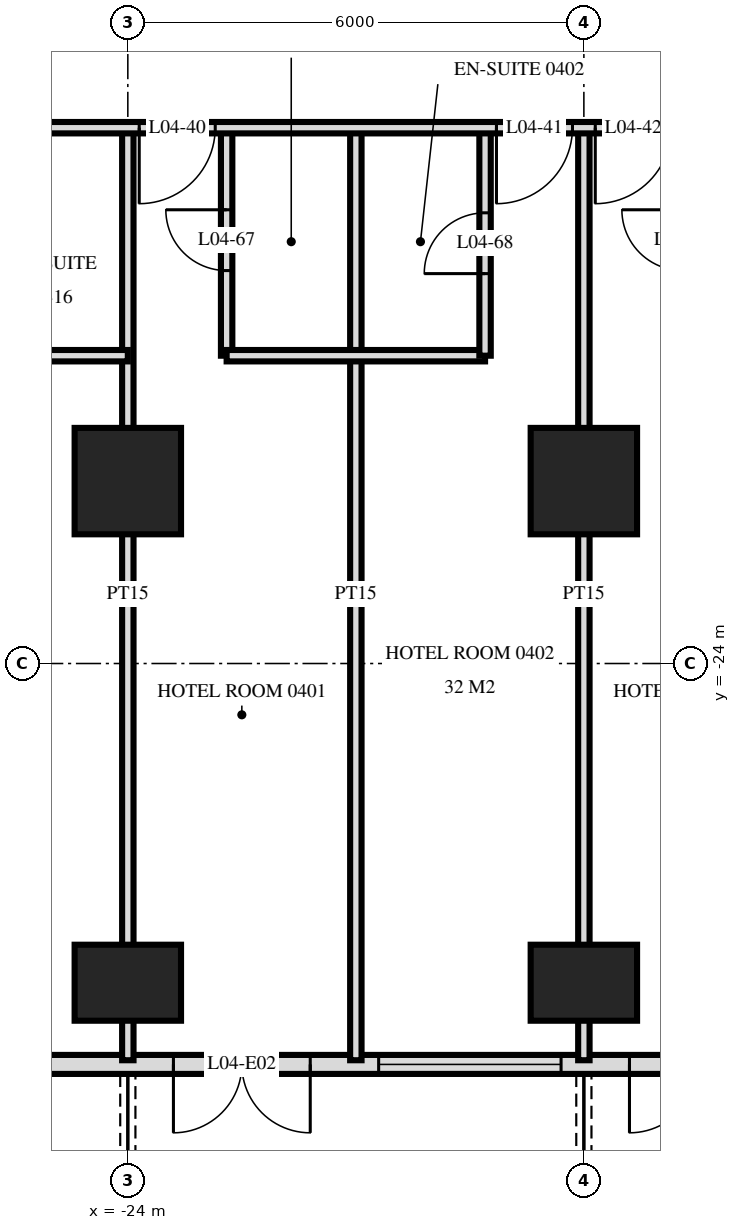
"""IFC4 building model, lengths in metres.
Left out: names, types, materials, properties, quantities, classifications, styles, units other than length and angle.
Written with IfcOpenShell. Run it as: python <this file> out.ifc"""

import sys

from ifc_helpers import new_model, si_unit, direction, frame, frame_2d, origin, origin_2d, place, context, subcontext, project, spatial, rectangle, extrude, element, fill, save


model = new_model("IFC4")
c1 = context("Model", 3, precision=1e-05, world=origin(), true_north=direction((0.0, 1.0)))
c2 = subcontext(c1, "Body", "Model", "MODEL_VIEW")
j1 = project(units=[si_unit("LENGTHUNIT", "METRE"), si_unit("PLANEANGLEUNIT", "RADIAN")], contexts=[c1])
p1 = place(None, origin())
s1 = spatial("IfcSite", under=j1, at=p1, CompositionType="ELEMENT")
p2 = place(p1, origin())
s2 = spatial("IfcBuilding", under=s1, at=p2, CompositionType="ELEMENT")
p3 = place(p2, frame((0.0, 0.0, 24.0)))
s3 = spatial("IfcBuildingStorey", under=s2, at=p3, CompositionType="ELEMENT", Elevation=24.0)
p4 = place(p3, frame((-24.0, -28.2, -0.28), z_axis=(0.0, 0.0, 1.0), x_axis=(1.0, 0.0, 0.0)))
e1 = element("IfcColumn", 1, at=p4, inside=s3, PredefinedType="COLUMN", context=c2, shape_type="SweptSolid", body=[
    extrude(rectangle(XDim=1.4, YDim=1.0, at=origin_2d()), origin(), (0.0, 0.0, 1.0), 3.88),
])
p5 = place(p3, frame((-24.0, -21.6, -0.28), z_axis=(0.0, 0.0, 1.0), x_axis=(1.0, 0.0, 0.0)))
e2 = element("IfcColumn", 2, at=p5, inside=s3, PredefinedType="COLUMN", context=c2, shape_type="SweptSolid", body=[
    extrude(rectangle(XDim=1.4, YDim=1.4, at=origin_2d()), origin(), (0.0, 0.0, 1.0), 3.88),
])
p6 = place(p3, frame((-18.0, -28.2, -0.28), z_axis=(0.0, 0.0, 1.0), x_axis=(1.0, 0.0, 0.0)))
e3 = element("IfcColumn", 3, at=p6, inside=s3, PredefinedType="COLUMN", context=c2, shape_type="SweptSolid", body=[
    extrude(rectangle(XDim=1.4, YDim=1.0, at=origin_2d()), origin(), (0.0, 0.0, 1.0), 3.88),
])
p7 = place(p3, frame((-18.0, -21.6, -0.28), z_axis=(0.0, 0.0, 1.0), x_axis=(1.0, 0.0, 0.0)))
e4 = element("IfcColumn", 4, at=p7, inside=s3, PredefinedType="COLUMN", context=c2, shape_type="SweptSolid", body=[
    extrude(rectangle(XDim=1.4, YDim=1.4, at=origin_2d()), origin(), (0.0, 0.0, 1.0), 3.88),
])
p8 = place(p3, frame((-28.775, -29.275, 0.0), z_axis=(0.0, 0.0, 1.0), x_axis=(1.0, 0.0, 0.0)))
e5 = element("IfcWall", 5, at=p8, inside=s3, PredefinedType="SOLIDWALL", context=c2, shape_type="SweptSolid", body=[
    extrude(rectangle(XDim=57.551, YDim=0.25, at=frame_2d((28.775, 0.0))), origin(), (0.0, 0.0, 1.0), 3.32),
])
p9 = place(p8, frame((0.575, 0.0, 0.0)))
e6 = element("IfcOpeningElement", 6, at=p9, cuts=e5, PredefinedType="OPENING", context=c2, shape_type="SweptSolid", body=[
    extrude(rectangle(XDim=1.8, YDim=2.4, at=frame_2d((0.9, 1.2))), frame((0.0, 0.135, 0.0), z_axis=(0.0, -1.0, 0.0), x_axis=(1.0, 0.0, 0.0)), (0.0, 0.0, 1.0), 0.27),
])
p10 = place(p8, frame((5.375, 0.0, 0.0)))
e7 = element("IfcOpeningElement", 7, at=p10, cuts=e5, PredefinedType="OPENING", context=c2, shape_type="SweptSolid", body=[
    extrude(rectangle(XDim=1.8, YDim=2.4, at=frame_2d((0.9, 1.2))), frame((0.0, 0.135, 0.0), z_axis=(0.0, -1.0, 0.0), x_axis=(1.0, 0.0, 0.0)), (0.0, 0.0, 1.0), 0.27),
])
p11 = place(p8, frame((8.075, 0.0, 0.3)))
e8 = element("IfcOpeningElement", 8, at=p11, cuts=e5, PredefinedType="OPENING", context=c2, shape_type="SweptSolid", body=[
    extrude(rectangle(XDim=2.4, YDim=2.1, at=frame_2d((1.2, 1.05))), frame((0.0, 0.135, 0.0), z_axis=(0.0, -1.0, 0.0), x_axis=(1.0, 0.0, 0.0)), (0.0, 0.0, 1.0), 0.27),
])
p12 = place(p8, frame((11.375, 0.0, 0.0)))
e9 = element("IfcOpeningElement", 9, at=p12, cuts=e5, PredefinedType="OPENING", context=c2, shape_type="SweptSolid", body=[
    extrude(rectangle(XDim=1.8, YDim=2.4, at=frame_2d((0.9, 1.2))), frame((0.0, 0.135, 0.0), z_axis=(0.0, -1.0, 0.0), x_axis=(1.0, 0.0, 0.0)), (0.0, 0.0, 1.0), 0.27),
])
p13 = place(p8, frame((14.075, 0.0, 0.3)))
e10 = element("IfcOpeningElement", 10, at=p13, cuts=e5, PredefinedType="OPENING", context=c2, shape_type="SweptSolid", body=[
    extrude(rectangle(XDim=2.4, YDim=2.1, at=frame_2d((1.2, 1.05))), frame((0.0, 0.135, 0.0), z_axis=(0.0, -1.0, 0.0), x_axis=(1.0, 0.0, 0.0)), (0.0, 0.0, 1.0), 0.27),
])
p14 = place(p8, frame((17.375, 0.0, 0.0)))
e11 = element("IfcOpeningElement", 11, at=p14, cuts=e5, PredefinedType="OPENING", context=c2, shape_type="SweptSolid", body=[
    extrude(rectangle(XDim=1.8, YDim=2.4, at=frame_2d((0.9, 1.2))), frame((0.0, 0.135, 0.0), z_axis=(0.0, -1.0, 0.0), x_axis=(1.0, 0.0, 0.0)), (0.0, 0.0, 1.0), 0.27),
])
p15 = place(p8, frame((20.075, 0.0, 0.3)))
e12 = element("IfcOpeningElement", 12, at=p15, cuts=e5, PredefinedType="OPENING", context=c2, shape_type="SweptSolid", body=[
    extrude(rectangle(XDim=2.4, YDim=2.1, at=frame_2d((1.2, 1.05))), frame((0.0, 0.135, 0.0), z_axis=(0.0, -1.0, 0.0), x_axis=(1.0, 0.0, 0.0)), (0.0, 0.0, 1.0), 0.27),
])
p16 = place(p8, frame((23.075, 0.0, 0.3)))
e13 = element("IfcOpeningElement", 13, at=p16, cuts=e5, PredefinedType="OPENING", context=c2, shape_type="SweptSolid", body=[
    extrude(rectangle(XDim=2.4, YDim=2.1, at=frame_2d((1.2, 1.05))), frame((0.0, 0.135, 0.0), z_axis=(0.0, -1.0, 0.0), x_axis=(1.0, 0.0, 0.0)), (0.0, 0.0, 1.0), 0.27),
])
p17 = place(p8, frame((26.375, 0.0, 0.0)))
e14 = element("IfcOpeningElement", 14, at=p17, cuts=e5, PredefinedType="OPENING", context=c2, shape_type="SweptSolid", body=[
    extrude(rectangle(XDim=1.8, YDim=2.4, at=frame_2d((0.9, 1.2))), frame((0.0, 0.135, 0.0), z_axis=(0.0, -1.0, 0.0), x_axis=(1.0, 0.0, 0.0)), (0.0, 0.0, 1.0), 0.27),
])
p18 = place(p8, frame((29.375, 0.0, 0.0)))
e15 = element("IfcOpeningElement", 15, at=p18, cuts=e5, PredefinedType="OPENING", context=c2, shape_type="SweptSolid", body=[
    extrude(rectangle(XDim=1.8, YDim=2.4, at=frame_2d((0.9, 1.2))), frame((0.0, 0.135, 0.0), z_axis=(0.0, -1.0, 0.0), x_axis=(1.0, 0.0, 0.0)), (0.0, 0.0, 1.0), 0.27),
])
p19 = place(p8, frame((32.075, 0.0, 0.3)))
e16 = element("IfcOpeningElement", 16, at=p19, cuts=e5, PredefinedType="OPENING", context=c2, shape_type="SweptSolid", body=[
    extrude(rectangle(XDim=2.4, YDim=2.1, at=frame_2d((1.2, 1.05))), frame((0.0, 0.135, 0.0), z_axis=(0.0, -1.0, 0.0), x_axis=(1.0, 0.0, 0.0)), (0.0, 0.0, 1.0), 0.27),
])
p20 = place(p8, frame((35.375, 0.0, 0.0)))
e17 = element("IfcOpeningElement", 17, at=p20, cuts=e5, PredefinedType="OPENING", context=c2, shape_type="SweptSolid", body=[
    extrude(rectangle(XDim=1.8, YDim=2.4, at=frame_2d((0.9, 1.2))), frame((0.0, 0.135, 0.0), z_axis=(0.0, -1.0, 0.0), x_axis=(1.0, 0.0, 0.0)), (0.0, 0.0, 1.0), 0.27),
])
p21 = place(p8, frame((38.075, 0.0, 0.3)))
e18 = element("IfcOpeningElement", 18, at=p21, cuts=e5, PredefinedType="OPENING", context=c2, shape_type="SweptSolid", body=[
    extrude(rectangle(XDim=2.4, YDim=2.1, at=frame_2d((1.2, 1.05))), frame((0.0, 0.135, 0.0), z_axis=(0.0, -1.0, 0.0), x_axis=(1.0, 0.0, 0.0)), (0.0, 0.0, 1.0), 0.27),
])
p22 = place(p8, frame((41.375, 0.0, 0.0)))
e19 = element("IfcOpeningElement", 19, at=p22, cuts=e5, PredefinedType="OPENING", context=c2, shape_type="SweptSolid", body=[
    extrude(rectangle(XDim=1.8, YDim=2.4, at=frame_2d((0.9, 1.2))), frame((0.0, 0.135, 0.0), z_axis=(0.0, -1.0, 0.0), x_axis=(1.0, 0.0, 0.0)), (0.0, 0.0, 1.0), 0.27),
])
p23 = place(p8, frame((44.075, 0.0, 0.3)))
e20 = element("IfcOpeningElement", 20, at=p23, cuts=e5, PredefinedType="OPENING", context=c2, shape_type="SweptSolid", body=[
    extrude(rectangle(XDim=2.4, YDim=2.1, at=frame_2d((1.2, 1.05))), frame((0.0, 0.135, 0.0), z_axis=(0.0, -1.0, 0.0), x_axis=(1.0, 0.0, 0.0)), (0.0, 0.0, 1.0), 0.27),
])
p24 = place(p8, frame((47.075, 0.0, 0.3)))
e21 = element("IfcOpeningElement", 21, at=p24, cuts=e5, PredefinedType="OPENING", context=c2, shape_type="SweptSolid", body=[
    extrude(rectangle(XDim=2.4, YDim=2.1, at=frame_2d((1.2, 1.05))), frame((0.0, 0.135, 0.0), z_axis=(0.0, -1.0, 0.0), x_axis=(1.0, 0.0, 0.0)), (0.0, 0.0, 1.0), 0.27),
])
p25 = place(p8, frame((50.375, 0.0, 0.0)))
e22 = element("IfcOpeningElement", 22, at=p25, cuts=e5, PredefinedType="OPENING", context=c2, shape_type="SweptSolid", body=[
    extrude(rectangle(XDim=1.8, YDim=2.4, at=frame_2d((0.9, 1.2))), frame((0.0, 0.135, 0.0), z_axis=(0.0, -1.0, 0.0), x_axis=(1.0, 0.0, 0.0)), (0.0, 0.0, 1.0), 0.27),
])
p26 = place(p8, frame((53.375, 0.0, 0.0)))
e23 = element("IfcOpeningElement", 23, at=p26, cuts=e5, PredefinedType="OPENING", context=c2, shape_type="SweptSolid", body=[
    extrude(rectangle(XDim=1.8, YDim=2.4, at=frame_2d((0.9, 1.2))), frame((0.0, 0.135, 0.0), z_axis=(0.0, -1.0, 0.0), x_axis=(1.0, 0.0, 0.0)), (0.0, 0.0, 1.0), 0.27),
])
p27 = place(p3, frame((-18.0, -29.22, 0.0), z_axis=(0.0, 0.0, 1.0), x_axis=(0.0, 1.0, 0.0)))
e24 = element("IfcWall", 24, at=p27, inside=s3, PredefinedType="PARTITIONING", context=c2, shape_type="SweptSolid", body=[
    extrude(rectangle(XDim=12.27, YDim=0.15, at=frame_2d((6.135, 0.0))), origin(), (0.0, 0.0, 1.0), 3.32),
])
p28 = place(p3, frame((-19.3, -19.95, 0.0), z_axis=(0.0, 0.0, 1.0), x_axis=(0.0, 1.0, 0.0)))
e25 = element("IfcWall", 25, at=p28, inside=s3, PredefinedType="PARTITIONING", context=c2, shape_type="SweptSolid", body=[
    extrude(rectangle(XDim=3.0, YDim=0.15, at=frame_2d((1.5, 0.0))), origin(), (0.0, 0.0, 1.0), 3.32),
])
p29 = place(p28, frame((1.08, 0.0, 0.0)))
e26 = element("IfcOpeningElement", 26, at=p29, cuts=e25, PredefinedType="OPENING", context=c2, shape_type="SweptSolid", body=[
    extrude(rectangle(XDim=0.8, YDim=2.1, at=frame_2d((0.4, 1.05))), frame((0.0, 0.085, 0.0), z_axis=(0.0, -1.0, 0.0), x_axis=(1.0, 0.0, 0.0)), (0.0, 0.0, 1.0), 0.17),
])
p30 = place(p3, frame((-21.0, -29.22, 0.0), z_axis=(0.0, 0.0, 1.0), x_axis=(0.0, 1.0, 0.0)))
e27 = element("IfcWall", 27, at=p30, inside=s3, PredefinedType="PARTITIONING", context=c2, shape_type="SweptSolid", body=[
    extrude(rectangle(XDim=12.27, YDim=0.15, at=frame_2d((6.135, 0.0))), origin(), (0.0, 0.0, 1.0), 3.32),
])
p31 = place(p3, frame((-22.7, -19.95, 0.0), z_axis=(0.0, 0.0, 1.0), x_axis=(0.0, 1.0, 0.0)))
e28 = element("IfcWall", 28, at=p31, inside=s3, PredefinedType="PARTITIONING", context=c2, shape_type="SweptSolid", body=[
    extrude(rectangle(XDim=3.0, YDim=0.15, at=frame_2d((1.5, 0.0))), origin(), (0.0, 0.0, 1.0), 3.32),
])
p32 = place(p31, frame((1.12, 0.0, 0.0)))
e29 = element("IfcOpeningElement", 29, at=p32, cuts=e28, PredefinedType="OPENING", context=c2, shape_type="SweptSolid", body=[
    extrude(rectangle(XDim=0.8, YDim=2.1, at=frame_2d((0.4, 1.05))), frame((0.0, 0.085, 0.0), z_axis=(0.0, -1.0, 0.0), x_axis=(1.0, 0.0, 0.0)), (0.0, 0.0, 1.0), 0.17),
])
p33 = place(p3, frame((-24.0, -29.22, 0.0), z_axis=(0.0, 0.0, 1.0), x_axis=(0.0, 1.0, 0.0)))
e30 = element("IfcWall", 30, at=p33, inside=s3, PredefinedType="PARTITIONING", context=c2, shape_type="SweptSolid", body=[
    extrude(rectangle(XDim=12.27, YDim=0.15, at=frame_2d((6.135, 0.0))), origin(), (0.0, 0.0, 1.0), 3.32),
])
p34 = place(p3, frame((-27.0, -19.95, 0.0), z_axis=(0.0, 0.0, 1.0), x_axis=(1.0, 0.0, 0.0)))
e31 = element("IfcWall", 31, at=p34, inside=s3, PredefinedType="PARTITIONING", context=c2, shape_type="SweptSolid", body=[
    extrude(rectangle(XDim=3.0, YDim=0.15, at=frame_2d((1.5, 0.0))), origin(), (0.0, 0.0, 1.0), 3.32),
])
p35 = place(p3, frame((-22.7, -19.95, 0.0), z_axis=(0.0, 0.0, 1.0), x_axis=(1.0, 0.0, 0.0)))
e32 = element("IfcWall", 32, at=p35, inside=s3, PredefinedType="PARTITIONING", context=c2, shape_type="SweptSolid", body=[
    extrude(rectangle(XDim=3.4, YDim=0.15, at=frame_2d((1.7, 0.0))), origin(), (0.0, 0.0, 1.0), 3.32),
])
p36 = place(p3, frame((-33.12, -16.95, 0.0), z_axis=(0.0, 0.0, 1.0), x_axis=(1.0, 0.0, 0.0)))
e33 = element("IfcWall", 33, at=p36, inside=s3, PredefinedType="PARTITIONING", context=c2, shape_type="SweptSolid", body=[
    extrude(rectangle(XDim=66.24, YDim=0.15, at=frame_2d((33.12, 0.0))), origin(), (0.0, 0.0, 1.0), 3.32),
])
p37 = place(p36, frame((9.27, 0.0, 0.0)))
e34 = element("IfcOpeningElement", 34, at=p37, cuts=e33, PredefinedType="OPENING", context=c2, shape_type="SweptSolid", body=[
    extrude(rectangle(XDim=1.0, YDim=2.1, at=frame_2d((0.5, 1.05))), frame((0.0, 0.085, 0.0), z_axis=(0.0, -1.0, 0.0), x_axis=(1.0, 0.0, 0.0)), (0.0, 0.0, 1.0), 0.17),
])
p38 = place(p36, frame((13.97, 0.0, 0.0)))
e35 = element("IfcOpeningElement", 35, at=p38, cuts=e33, PredefinedType="OPENING", context=c2, shape_type="SweptSolid", body=[
    extrude(rectangle(XDim=1.0, YDim=2.1, at=frame_2d((0.5, 1.05))), frame((0.0, 0.085, 0.0), z_axis=(0.0, -1.0, 0.0), x_axis=(1.0, 0.0, 0.0)), (0.0, 0.0, 1.0), 0.17),
])
p39 = place(p36, frame((15.27, 0.0, 0.0)))
e36 = element("IfcOpeningElement", 36, at=p39, cuts=e33, PredefinedType="OPENING", context=c2, shape_type="SweptSolid", body=[
    extrude(rectangle(XDim=1.0, YDim=2.1, at=frame_2d((0.5, 1.05))), frame((0.0, 0.085, 0.0), z_axis=(0.0, -1.0, 0.0), x_axis=(1.0, 0.0, 0.0)), (0.0, 0.0, 1.0), 0.17),
])
p40 = place(p36, frame((19.97, 0.0, 0.0)))
e37 = element("IfcOpeningElement", 37, at=p40, cuts=e33, PredefinedType="OPENING", context=c2, shape_type="SweptSolid", body=[
    extrude(rectangle(XDim=1.0, YDim=2.1, at=frame_2d((0.5, 1.05))), frame((0.0, 0.085, 0.0), z_axis=(0.0, -1.0, 0.0), x_axis=(1.0, 0.0, 0.0)), (0.0, 0.0, 1.0), 0.17),
])
p41 = place(p36, frame((22.27, 0.0, 0.0)))
e38 = element("IfcOpeningElement", 38, at=p41, cuts=e33, PredefinedType="OPENING", context=c2, shape_type="SweptSolid", body=[
    extrude(rectangle(XDim=1.0, YDim=2.1, at=frame_2d((0.5, 1.05))), frame((0.0, 0.085, 0.0), z_axis=(0.0, -1.0, 0.0), x_axis=(1.0, 0.0, 0.0)), (0.0, 0.0, 1.0), 0.17),
])
p42 = place(p36, frame((28.97, 0.0, 0.0)))
e39 = element("IfcOpeningElement", 39, at=p42, cuts=e33, PredefinedType="OPENING", context=c2, shape_type="SweptSolid", body=[
    extrude(rectangle(XDim=1.0, YDim=2.1, at=frame_2d((0.5, 1.05))), frame((0.0, 0.085, 0.0), z_axis=(0.0, -1.0, 0.0), x_axis=(1.0, 0.0, 0.0)), (0.0, 0.0, 1.0), 0.17),
])
p43 = place(p36, frame((30.27, 0.0, 0.0)))
e40 = element("IfcOpeningElement", 40, at=p43, cuts=e33, PredefinedType="OPENING", context=c2, shape_type="SweptSolid", body=[
    extrude(rectangle(XDim=1.0, YDim=2.1, at=frame_2d((0.5, 1.05))), frame((0.0, 0.085, 0.0), z_axis=(0.0, -1.0, 0.0), x_axis=(1.0, 0.0, 0.0)), (0.0, 0.0, 1.0), 0.17),
])
p44 = place(p36, frame((34.97, 0.0, 0.0)))
e41 = element("IfcOpeningElement", 41, at=p44, cuts=e33, PredefinedType="OPENING", context=c2, shape_type="SweptSolid", body=[
    extrude(rectangle(XDim=1.0, YDim=2.1, at=frame_2d((0.5, 1.05))), frame((0.0, 0.085, 0.0), z_axis=(0.0, -1.0, 0.0), x_axis=(1.0, 0.0, 0.0)), (0.0, 0.0, 1.0), 0.17),
])
p45 = place(p36, frame((36.27, 0.0, 0.0)))
e42 = element("IfcOpeningElement", 42, at=p45, cuts=e33, PredefinedType="OPENING", context=c2, shape_type="SweptSolid", body=[
    extrude(rectangle(XDim=1.0, YDim=2.1, at=frame_2d((0.5, 1.05))), frame((0.0, 0.085, 0.0), z_axis=(0.0, -1.0, 0.0), x_axis=(1.0, 0.0, 0.0)), (0.0, 0.0, 1.0), 0.17),
])
p46 = place(p36, frame((40.97, 0.0, 0.0)))
e43 = element("IfcOpeningElement", 43, at=p46, cuts=e33, PredefinedType="OPENING", context=c2, shape_type="SweptSolid", body=[
    extrude(rectangle(XDim=1.0, YDim=2.1, at=frame_2d((0.5, 1.05))), frame((0.0, 0.085, 0.0), z_axis=(0.0, -1.0, 0.0), x_axis=(1.0, 0.0, 0.0)), (0.0, 0.0, 1.0), 0.17),
])
p47 = place(p36, frame((42.27, 0.0, 0.0)))
e44 = element("IfcOpeningElement", 44, at=p47, cuts=e33, PredefinedType="OPENING", context=c2, shape_type="SweptSolid", body=[
    extrude(rectangle(XDim=1.0, YDim=2.1, at=frame_2d((0.5, 1.05))), frame((0.0, 0.085, 0.0), z_axis=(0.0, -1.0, 0.0), x_axis=(1.0, 0.0, 0.0)), (0.0, 0.0, 1.0), 0.17),
])
p48 = place(p36, frame((46.97, 0.0, 0.0)))
e45 = element("IfcOpeningElement", 45, at=p48, cuts=e33, PredefinedType="OPENING", context=c2, shape_type="SweptSolid", body=[
    extrude(rectangle(XDim=1.0, YDim=2.1, at=frame_2d((0.5, 1.05))), frame((0.0, 0.085, 0.0), z_axis=(0.0, -1.0, 0.0), x_axis=(1.0, 0.0, 0.0)), (0.0, 0.0, 1.0), 0.17),
])
p49 = place(p36, frame((48.27, 0.0, 0.0)))
e46 = element("IfcOpeningElement", 46, at=p49, cuts=e33, PredefinedType="OPENING", context=c2, shape_type="SweptSolid", body=[
    extrude(rectangle(XDim=1.0, YDim=2.1, at=frame_2d((0.5, 1.05))), frame((0.0, 0.085, 0.0), z_axis=(0.0, -1.0, 0.0), x_axis=(1.0, 0.0, 0.0)), (0.0, 0.0, 1.0), 0.17),
])
p50 = place(p36, frame((52.97, 0.0, 0.0)))
e47 = element("IfcOpeningElement", 47, at=p50, cuts=e33, PredefinedType="OPENING", context=c2, shape_type="SweptSolid", body=[
    extrude(rectangle(XDim=1.0, YDim=2.1, at=frame_2d((0.5, 1.05))), frame((0.0, 0.085, 0.0), z_axis=(0.0, -1.0, 0.0), x_axis=(1.0, 0.0, 0.0)), (0.0, 0.0, 1.0), 0.17),
])
p51 = place(p36, frame((54.27, 0.0, 0.0)))
e48 = element("IfcOpeningElement", 48, at=p51, cuts=e33, PredefinedType="OPENING", context=c2, shape_type="SweptSolid", body=[
    extrude(rectangle(XDim=1.0, YDim=2.1, at=frame_2d((0.5, 1.05))), frame((0.0, 0.085, 0.0), z_axis=(0.0, -1.0, 0.0), x_axis=(1.0, 0.0, 0.0)), (0.0, 0.0, 1.0), 0.17),
])
p52 = place(p36, frame((4.4, 0.0, 0.0)))
e49 = element("IfcOpeningElement", 49, at=p52, cuts=e33, PredefinedType="OPENING", context=c2, shape_type="SweptSolid", body=[
    extrude(rectangle(XDim=1.0, YDim=2.1, at=frame_2d((0.5, 1.05))), frame((0.0, 0.085, 0.0), z_axis=(0.0, -1.0, 0.0), x_axis=(1.0, 0.0, 0.0)), (0.0, 0.0, 1.0), 0.17),
])
p53 = place(p36, frame((60.8, 0.0, 0.0)))
e50 = element("IfcOpeningElement", 50, at=p53, cuts=e33, PredefinedType="OPENING", context=c2, shape_type="SweptSolid", body=[
    extrude(rectangle(XDim=1.0, YDim=2.1, at=frame_2d((0.5, 1.05))), frame((0.0, 0.085, 0.0), z_axis=(0.0, -1.0, 0.0), x_axis=(1.0, 0.0, 0.0)), (0.0, 0.0, 1.0), 0.17),
])
p54 = place(p10, frame((0.9, 0.0, 0.0), z_axis=(0.0, 0.0, 1.0), x_axis=(-1.0, 0.0, 0.0)))
e51 = element("IfcDoor", 51, at=p54, inside=s3, OperationType="DOUBLE_DOOR_SINGLE_SWING", PredefinedType="DOOR", context=c2, shape_type="SweptSolid", body=[
    extrude(rectangle(XDim=1.8, YDim=2.4, at=frame_2d((0.0, 1.2))), frame((0.0, -0.025, 0.0), z_axis=(0.0, 1.0, 0.0), x_axis=(-1.0, 0.0, 0.0)), (0.0, 0.0, 1.0), 0.05),
])
fill(e7, e51)
p55 = place(p11, origin())
e52 = element("IfcWindow", 52, at=p55, inside=s3, PartitioningType="SINGLE_PANEL", PredefinedType="WINDOW", context=c2, shape_type="SweptSolid", body=[
    extrude(rectangle(XDim=2.4, YDim=2.1, at=frame_2d((1.2, 1.05))), frame((0.0, 0.03, 0.0), z_axis=(0.0, -1.0, 0.0), x_axis=(1.0, 0.0, 0.0)), (0.0, 0.0, 1.0), 0.06),
])
fill(e8, e52)
p56 = place(p12, frame((0.9, 0.0, 0.0), z_axis=(0.0, 0.0, 1.0), x_axis=(-1.0, 0.0, 0.0)))
e53 = element("IfcDoor", 53, at=p56, inside=s3, OperationType="DOUBLE_DOOR_SINGLE_SWING", PredefinedType="DOOR", context=c2, shape_type="SweptSolid", body=[
    extrude(rectangle(XDim=1.8, YDim=2.4, at=frame_2d((0.0, 1.2))), frame((0.0, -0.025, 0.0), z_axis=(0.0, 1.0, 0.0), x_axis=(-1.0, 0.0, 0.0)), (0.0, 0.0, 1.0), 0.05),
])
fill(e9, e53)
p57 = place(p37, frame((0.5, 0.0, 0.0), z_axis=(0.0, 0.0, 1.0), x_axis=(-1.0, 0.0, 0.0)))
e54 = element("IfcDoor", 54, at=p57, inside=s3, OperationType="SINGLE_SWING_LEFT", PredefinedType="DOOR", context=c2, shape_type="SweptSolid", body=[
    extrude(rectangle(XDim=1.0, YDim=2.1, at=frame_2d((0.0, 1.05))), frame((0.0, -0.025, 0.0), z_axis=(0.0, 1.0, 0.0), x_axis=(-1.0, 0.0, 0.0)), (0.0, 0.0, 1.0), 0.05),
])
fill(e34, e54)
p58 = place(p38, frame((0.5, 0.0, 0.0), z_axis=(0.0, 0.0, 1.0), x_axis=(-1.0, 0.0, 0.0)))
e55 = element("IfcDoor", 55, at=p58, inside=s3, OperationType="SINGLE_SWING_LEFT", PredefinedType="DOOR", context=c2, shape_type="SweptSolid", body=[
    extrude(rectangle(XDim=1.0, YDim=2.1, at=frame_2d((0.0, 1.05))), frame((0.0, -0.025, 0.0), z_axis=(0.0, 1.0, 0.0), x_axis=(-1.0, 0.0, 0.0)), (0.0, 0.0, 1.0), 0.05),
])
fill(e35, e55)
p59 = place(p39, frame((0.5, 0.0, 0.0), z_axis=(0.0, 0.0, 1.0), x_axis=(-1.0, 0.0, 0.0)))
e56 = element("IfcDoor", 56, at=p59, inside=s3, OperationType="SINGLE_SWING_LEFT", PredefinedType="DOOR", context=c2, shape_type="SweptSolid", body=[
    extrude(rectangle(XDim=1.0, YDim=2.1, at=frame_2d((0.0, 1.05))), frame((0.0, -0.025, 0.0), z_axis=(0.0, 1.0, 0.0), x_axis=(-1.0, 0.0, 0.0)), (0.0, 0.0, 1.0), 0.05),
])
fill(e36, e56)
p60 = place(p32, origin())
e57 = element("IfcDoor", 57, at=p60, inside=s3, OperationType="SINGLE_SWING_LEFT", PredefinedType="DOOR", context=c2, shape_type="SweptSolid", body=[
    extrude(rectangle(XDim=0.8, YDim=2.1, at=frame_2d((0.4, 1.05))), frame((0.0, 0.025, 0.0), z_axis=(0.0, -1.0, 0.0), x_axis=(1.0, 0.0, 0.0)), (0.0, 0.0, 1.0), 0.05),
])
fill(e29, e57)
p61 = place(p29, origin())
e58 = element("IfcDoor", 58, at=p61, inside=s3, OperationType="SINGLE_SWING_RIGHT", PredefinedType="DOOR", context=c2, shape_type="SweptSolid", body=[
    extrude(rectangle(XDim=0.8, YDim=2.1, at=frame_2d((0.4, 1.05))), frame((0.0, 0.025, 0.0), z_axis=(0.0, -1.0, 0.0), x_axis=(1.0, 0.0, 0.0)), (0.0, 0.0, 1.0), 0.05),
])
fill(e26, e58)
save(model, sys.argv[1])
